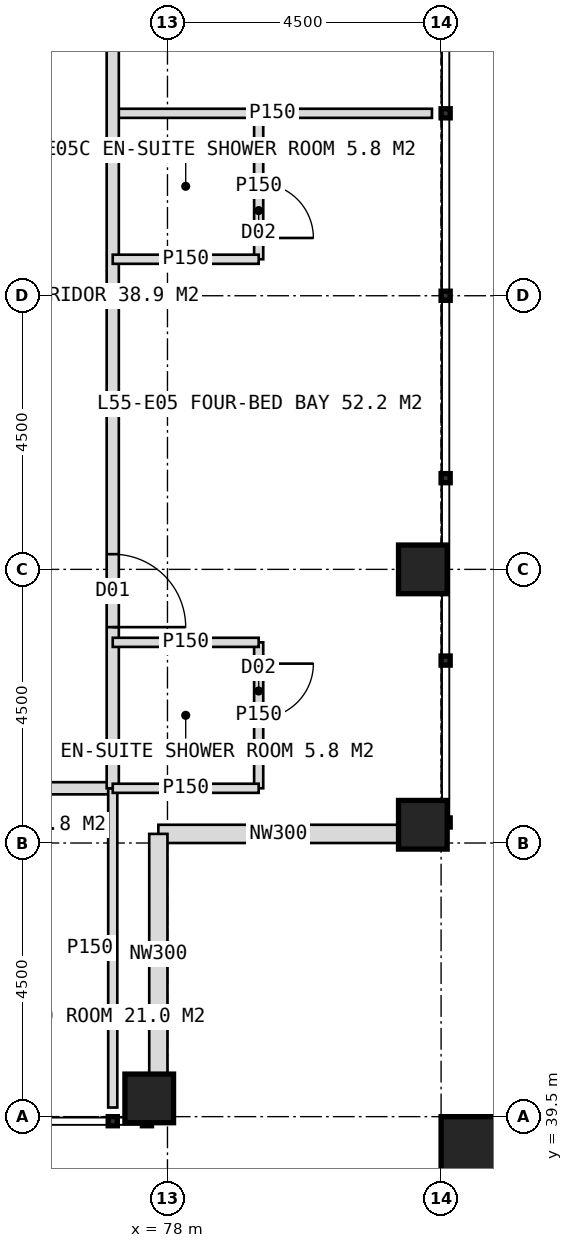
"""IFC4 building model, lengths in metres.
Left out: names, types, materials, properties, quantities, classifications, styles, units other than length and angle.
Written with IfcOpenShell. Run it as: python <this file> out.ifc"""

import sys

from ifc_helpers import new_model, si_unit, direction, frame, frame_2d, origin, origin_2d, place, context, subcontext, project, spatial, rectangle, hollow_rectangle, extrude, element, fill, save


model = new_model("IFC4")
c1 = context("Model", 3, precision=1e-05, world=origin(), true_north=direction((0.0, 1.0)))
c2 = subcontext(c1, "Body", "Model", "MODEL_VIEW")
j1 = project(units=[si_unit("LENGTHUNIT", "METRE"), si_unit("PLANEANGLEUNIT", "RADIAN")], contexts=[c1])
p1 = place(None, origin())
s1 = spatial("IfcSite", under=j1, at=p1, CompositionType="ELEMENT")
p2 = place(p1, origin())
s2 = spatial("IfcBuilding", under=s1, at=p2, CompositionType="ELEMENT")
p3 = place(p2, frame((0.0, 0.0, 229.0)))
s3 = spatial("IfcBuildingStorey", under=s2, at=p3, CompositionType="ELEMENT", Elevation=229.0)
for number, where, z_axis, x_axis in (
    (1, (82.2, 44.3, 0.0), (0.0, 0.0, 1.0), (1.0, 0.0, 0.0)),
    (2, (82.2, 48.5, 0.0), (0.0, 0.0, 1.0), (1.0, 0.0, 0.0)),
    (3, (77.7, 39.8, 0.0), (0.0, 0.0, 1.0), (1.0, 0.0, 0.0)),
):
    element("IfcColumn", number, at=place(p3, frame(where, z_axis=z_axis, x_axis=x_axis)), inside=s3, PredefinedType="COLUMN", context=c2, shape_type="SweptSolid", body=[
        extrude(hollow_rectangle(XDim=0.8, YDim=0.8, WallThickness=0.08, at=origin_2d()), origin(), (0.0, 0.0, 1.0), 4.0),
    ])
p4 = place(p3, frame((83.1, 38.9, 0.0), z_axis=(0.0, 0.0, 1.0), x_axis=(1.0, 0.0, 0.0)))
e4 = element("IfcColumn", 4, at=p4, inside=s3, PredefinedType="COLUMN", context=c2, shape_type="SweptSolid", body=[
    extrude(hollow_rectangle(XDim=1.2, YDim=1.2, WallThickness=0.07, at=origin_2d()), origin(), (0.0, 0.0, 1.0), 4.0),
])
for number, where, z_axis, x_axis in (
    (5, (81.8, 44.15, 0.0), (0.0, 0.0, 1.0), (-1.0, 0.0, 0.0)),
    (6, (77.85, 44.15, 0.0), (0.0, 0.0, 1.0), (0.0, -1.0, 0.0)),
):
    element("IfcWall", number, at=place(p3, frame(where, z_axis=z_axis, x_axis=x_axis)), inside=s3, PredefinedType="ELEMENTEDWALL", context=c2, shape_type="SweptSolid", body=[
        extrude(rectangle(XDim=3.95, YDim=0.3, at=frame_2d((1.975, 0.0))), origin(), (0.0, 0.0, 1.0), 2.85),
    ])
p5 = place(p3, frame((77.1, 44.9, 0.0), z_axis=(0.0, 0.0, 1.0), x_axis=(-1.0, 0.0, 0.0)))
e7 = element("IfcWall", 7, at=p5, inside=s3, PredefinedType="PARTITIONING", context=c2, shape_type="SweptSolid", body=[
    extrude(rectangle(XDim=34.2, YDim=0.2, at=frame_2d((17.1, 0.0))), origin(), (0.0, 0.0, 1.0), 3.75),
])
p6 = place(p5, frame((1.25, 0.0, 0.0)))
e8 = element("IfcOpeningElement", 8, at=p6, cuts=e7, PredefinedType="OPENING", context=c2, shape_type="SweptSolid", body=[
    extrude(rectangle(XDim=1.2, YDim=2.2, at=frame_2d((0.6, 1.1))), frame((0.0, 0.11, 0.0), z_axis=(0.0, -1.0, 0.0), x_axis=(1.0, 0.0, 0.0)), (0.0, 0.0, 1.0), 0.22),
])
p7 = place(p5, frame((7.75, 0.0, 0.0)))
e9 = element("IfcOpeningElement", 9, at=p7, cuts=e7, PredefinedType="OPENING", context=c2, shape_type="SweptSolid", body=[
    extrude(rectangle(XDim=1.2, YDim=2.2, at=frame_2d((0.6, 1.1))), frame((0.0, 0.11, 0.0), z_axis=(0.0, -1.0, 0.0), x_axis=(1.0, 0.0, 0.0)), (0.0, 0.0, 1.0), 0.22),
])
p8 = place(p5, frame((13.25, 0.0, 0.0)))
e10 = element("IfcOpeningElement", 10, at=p8, cuts=e7, PredefinedType="OPENING", context=c2, shape_type="SweptSolid", body=[
    extrude(rectangle(XDim=1.2, YDim=2.2, at=frame_2d((0.6, 1.1))), frame((0.0, 0.11, 0.0), z_axis=(0.0, -1.0, 0.0), x_axis=(1.0, 0.0, 0.0)), (0.0, 0.0, 1.0), 0.22),
])
p9 = place(p5, frame((19.75, 0.0, 0.0)))
e11 = element("IfcOpeningElement", 11, at=p9, cuts=e7, PredefinedType="OPENING", context=c2, shape_type="SweptSolid", body=[
    extrude(rectangle(XDim=1.2, YDim=2.2, at=frame_2d((0.6, 1.1))), frame((0.0, 0.11, 0.0), z_axis=(0.0, -1.0, 0.0), x_axis=(1.0, 0.0, 0.0)), (0.0, 0.0, 1.0), 0.22),
])
p10 = place(p5, frame((30.35, 0.0, 0.0)))
e12 = element("IfcOpeningElement", 12, at=p10, cuts=e7, PredefinedType="OPENING", context=c2, shape_type="SweptSolid", body=[
    extrude(rectangle(XDim=1.2, YDim=2.2, at=frame_2d((0.6, 1.1))), frame((0.0, 0.11, 0.0), z_axis=(0.0, -1.0, 0.0), x_axis=(1.0, 0.0, 0.0)), (0.0, 0.0, 1.0), 0.22),
])
for number, where, z_axis, x_axis in (
    (13, (77.1, 44.9, 0.0), (0.0, 0.0, 1.0), (0.0, -1.0, 0.0)),
    (14, (77.1, 56.0, 0.0), (0.0, 0.0, 1.0), (1.0, 0.0, 0.0)),
):
    element("IfcWall", number, at=place(p3, frame(where, z_axis=z_axis, x_axis=x_axis)), inside=s3, PredefinedType="PARTITIONING", context=c2, shape_type="SweptSolid", body=[
        extrude(rectangle(XDim=5.25, YDim=0.15, at=frame_2d((2.625, 0.0))), origin(), (0.0, 0.0, 1.0), 3.75),
    ])
p11 = place(p3, frame((77.1, 79.1, 0.0), z_axis=(0.0, 0.0, 1.0), x_axis=(0.0, -1.0, 0.0)))
e15 = element("IfcWall", 15, at=p11, inside=s3, PredefinedType="PARTITIONING", context=c2, shape_type="SweptSolid", body=[
    extrude(rectangle(XDim=34.2, YDim=0.2, at=frame_2d((17.1, 0.0))), origin(), (0.0, 0.0, 1.0), 3.75),
])
p12 = place(p11, frame((3.65, 0.0, 0.0)))
e16 = element("IfcOpeningElement", 16, at=p12, cuts=e15, PredefinedType="OPENING", context=c2, shape_type="SweptSolid", body=[
    extrude(rectangle(XDim=1.2, YDim=2.2, at=frame_2d((0.6, 1.1))), frame((0.0, 0.11, 0.0), z_axis=(0.0, -1.0, 0.0), x_axis=(1.0, 0.0, 0.0)), (0.0, 0.0, 1.0), 0.22),
])
p13 = place(p11, frame((10.75, 0.0, 0.0)))
e17 = element("IfcOpeningElement", 17, at=p13, cuts=e15, PredefinedType="OPENING", context=c2, shape_type="SweptSolid", body=[
    extrude(rectangle(XDim=1.2, YDim=2.2, at=frame_2d((0.6, 1.1))), frame((0.0, 0.11, 0.0), z_axis=(0.0, -1.0, 0.0), x_axis=(1.0, 0.0, 0.0)), (0.0, 0.0, 1.0), 0.22),
])
p14 = place(p11, frame((15.1, 0.0, 0.0)))
e18 = element("IfcOpeningElement", 18, at=p14, cuts=e15, PredefinedType="OPENING", context=c2, shape_type="SweptSolid", body=[
    extrude(rectangle(XDim=1.0, YDim=2.1, at=frame_2d((0.5, 1.05))), frame((0.0, 0.11, 0.0), z_axis=(0.0, -1.0, 0.0), x_axis=(1.0, 0.0, 0.0)), (0.0, 0.0, 1.0), 0.22),
])
p15 = place(p11, frame((19.75, 0.0, 0.0)))
e19 = element("IfcOpeningElement", 19, at=p15, cuts=e15, PredefinedType="OPENING", context=c2, shape_type="SweptSolid", body=[
    extrude(rectangle(XDim=1.2, YDim=2.2, at=frame_2d((0.6, 1.1))), frame((0.0, 0.11, 0.0), z_axis=(0.0, -1.0, 0.0), x_axis=(1.0, 0.0, 0.0)), (0.0, 0.0, 1.0), 0.22),
])
p16 = place(p11, frame((30.35, 0.0, 0.0)))
e20 = element("IfcOpeningElement", 20, at=p16, cuts=e15, PredefinedType="OPENING", context=c2, shape_type="SweptSolid", body=[
    extrude(rectangle(XDim=1.2, YDim=2.2, at=frame_2d((0.6, 1.1))), frame((0.0, 0.11, 0.0), z_axis=(0.0, -1.0, 0.0), x_axis=(1.0, 0.0, 0.0)), (0.0, 0.0, 1.0), 0.22),
])
p17 = place(p3, frame((79.5, 47.3, 0.0), z_axis=(0.0, 0.0, 1.0), x_axis=(0.0, -1.0, 0.0)))
e21 = element("IfcWall", 21, at=p17, inside=s3, PredefinedType="PARTITIONING", context=c2, shape_type="SweptSolid", body=[
    extrude(rectangle(XDim=2.4, YDim=0.15, at=frame_2d((1.2, 0.0))), origin(), (0.0, 0.0, 1.0), 3.75),
])
p18 = place(p17, frame((0.35, 0.0, 0.0)))
e22 = element("IfcOpeningElement", 22, at=p18, cuts=e21, PredefinedType="OPENING", context=c2, shape_type="SweptSolid", body=[
    extrude(rectangle(XDim=0.9, YDim=2.1, at=frame_2d((0.45, 1.05))), frame((0.0, 0.085, 0.0), z_axis=(0.0, -1.0, 0.0), x_axis=(1.0, 0.0, 0.0)), (0.0, 0.0, 1.0), 0.17),
])
p19 = place(p3, frame((77.1, 47.3, 0.0), z_axis=(0.0, 0.0, 1.0), x_axis=(1.0, 0.0, 0.0)))
e23 = element("IfcWall", 23, at=p19, inside=s3, PredefinedType="PARTITIONING", context=c2, shape_type="SweptSolid", body=[
    extrude(rectangle(XDim=2.4, YDim=0.15, at=frame_2d((1.2, 0.0))), origin(), (0.0, 0.0, 1.0), 3.75),
])
p20 = place(p3, frame((79.5, 56.0, 0.0), z_axis=(0.0, 0.0, 1.0), x_axis=(0.0, -1.0, 0.0)))
e24 = element("IfcWall", 24, at=p20, inside=s3, PredefinedType="PARTITIONING", context=c2, shape_type="SweptSolid", body=[
    extrude(rectangle(XDim=2.4, YDim=0.15, at=frame_2d((1.2, 0.0))), origin(), (0.0, 0.0, 1.0), 3.75),
])
p21 = place(p20, frame((1.15, 0.0, 0.0)))
e25 = element("IfcOpeningElement", 25, at=p21, cuts=e24, PredefinedType="OPENING", context=c2, shape_type="SweptSolid", body=[
    extrude(rectangle(XDim=0.9, YDim=2.1, at=frame_2d((0.45, 1.05))), frame((0.0, 0.085, 0.0), z_axis=(0.0, -1.0, 0.0), x_axis=(1.0, 0.0, 0.0)), (0.0, 0.0, 1.0), 0.17),
])
for number, where, z_axis, x_axis in (
    (26, (77.1, 53.6, 0.0), (0.0, 0.0, 1.0), (1.0, 0.0, 0.0)),
    (27, (77.1, 44.9, 0.0), (0.0, 0.0, 1.0), (1.0, 0.0, 0.0)),
):
    element("IfcWall", number, at=place(p3, frame(where, z_axis=z_axis, x_axis=x_axis)), inside=s3, PredefinedType="PARTITIONING", context=c2, shape_type="SweptSolid", body=[
        extrude(rectangle(XDim=2.4, YDim=0.15, at=frame_2d((1.2, 0.0))), origin(), (0.0, 0.0, 1.0), 3.75),
    ])
p22 = place(p16, origin())
e28 = element("IfcDoor", 28, at=p22, inside=s3, OperationType="SINGLE_SWING_RIGHT", PredefinedType="DOOR", context=c2, shape_type="SweptSolid", body=[
    extrude(rectangle(XDim=1.2, YDim=2.2, at=frame_2d((0.6, 1.1))), frame((0.0, 0.025, 0.0), z_axis=(0.0, -1.0, 0.0), x_axis=(1.0, 0.0, 0.0)), (0.0, 0.0, 1.0), 0.05),
])
fill(e20, e28)
p23 = place(p18, origin())
e29 = element("IfcDoor", 29, at=p23, inside=s3, OperationType="SINGLE_SWING_LEFT", PredefinedType="DOOR", context=c2, shape_type="SweptSolid", body=[
    extrude(rectangle(XDim=0.9, YDim=2.1, at=frame_2d((0.45, 1.05))), frame((0.0, 0.025, 0.0), z_axis=(0.0, -1.0, 0.0), x_axis=(1.0, 0.0, 0.0)), (0.0, 0.0, 1.0), 0.05),
])
fill(e22, e29)
p24 = place(p21, origin())
e30 = element("IfcDoor", 30, at=p24, inside=s3, OperationType="SINGLE_SWING_RIGHT", PredefinedType="DOOR", context=c2, shape_type="SweptSolid", body=[
    extrude(rectangle(XDim=0.9, YDim=2.1, at=frame_2d((0.45, 1.05))), frame((0.0, 0.025, 0.0), z_axis=(0.0, -1.0, 0.0), x_axis=(1.0, 0.0, 0.0)), (0.0, 0.0, 1.0), 0.05),
])
fill(e25, e30)
save(model, sys.argv[1])
